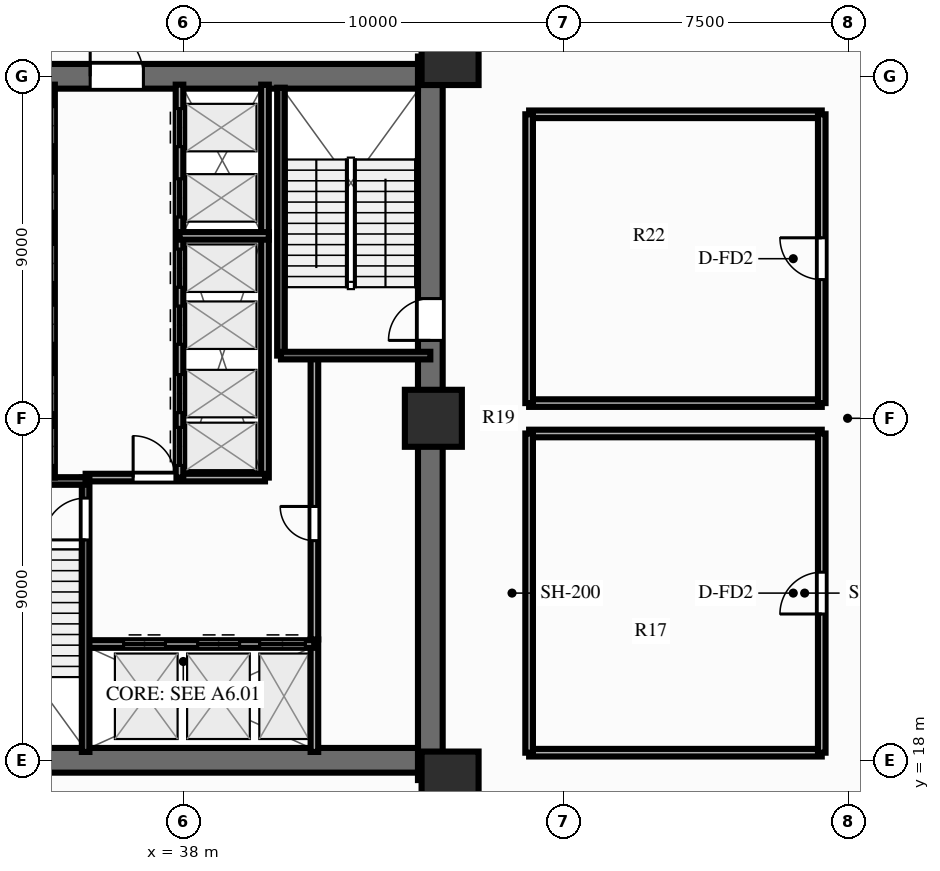
"""IFC4 building model, lengths in metres.
Left out: names, types, materials, properties, quantities, classifications, styles, units other than length and angle.
Written with IfcOpenShell. Run it as: python <this file> out.ifc"""

import sys

from ifc_helpers import new_model, si_unit, direction, frame, frame_2d, origin, origin_2d, place, context, subcontext, project, spatial, rectangle, extrude, source, transform, mapped, element, fill, save


model = new_model("IFC4")
c1 = context("Model", 3, precision=1e-05, world=origin(), true_north=direction((0.0, 1.0)))
c2 = subcontext(c1, "Body", "Model", "MODEL_VIEW")
j1 = project(units=[si_unit("LENGTHUNIT", "METRE"), si_unit("PLANEANGLEUNIT", "RADIAN")], contexts=[c1])
p1 = place(None, origin())
s1 = spatial("IfcSite", under=j1, at=p1, CompositionType="ELEMENT")
p2 = place(p1, origin())
s2 = spatial("IfcBuilding", under=s1, at=p2, CompositionType="ELEMENT")
p3 = place(p2, frame((0.0, 0.0, -4.6)))
s3 = spatial("IfcBuildingStorey", under=s2, at=p3, CompositionType="ELEMENT", Elevation=-4.6)
p4 = place(p3, frame((44.5, 17.48, 0.0), z_axis=(0.0, 0.0, 1.0), x_axis=(0.0, 1.0, 0.0)))
e1 = element("IfcWall", 1, at=p4, inside=s3, PredefinedType="SHEAR", context=c2, shape_type="SweptSolid", body=[
    extrude(rectangle(XDim=19.04, YDim=0.65, at=frame_2d((9.52, 0.0))), origin(), (0.0, 0.0, 1.0), 4.6),
])
p5 = place(p4, frame((12.67, 0.0, 0.0), z_axis=(0.0, 0.0, 1.0), x_axis=(-1.0, 0.0, 0.0)))
e2 = element("IfcOpeningElement", 2, at=p5, cuts=e1, PredefinedType="OPENING", context=c2, shape_type="SweptSolid", body=[
    extrude(rectangle(XDim=1.1, YDim=2.15, at=frame_2d((0.55, 1.075))), frame((0.0, 0.337, 0.0), z_axis=(0.0, -1.0, 0.0), x_axis=(1.0, 0.0, 0.0)), (0.0, 0.0, 1.0), 0.674),
])
p6 = place(p3, frame((31.825, 18.0, 0.0), z_axis=(0.0, 0.0, 1.0), x_axis=(1.0, 0.0, 0.0)))
e3 = element("IfcWall", 3, at=p6, inside=s3, PredefinedType="SHEAR", context=c2, shape_type="SweptSolid", body=[
    extrude(rectangle(XDim=12.35, YDim=0.65, at=frame_2d((6.175, 0.0))), origin(), (0.0, 0.0, 1.0), 4.6),
])
p7 = place(p3, frame((31.825, 36.0, 0.0), z_axis=(0.0, 0.0, 1.0), x_axis=(1.0, 0.0, 0.0)))
e4 = element("IfcWall", 4, at=p7, inside=s3, PredefinedType="SHEAR", context=c2, shape_type="SweptSolid", body=[
    extrude(rectangle(XDim=12.35, YDim=0.65, at=frame_2d((6.175, 0.0))), origin(), (0.0, 0.0, 1.0), 4.6),
])
p8 = place(p7, frame((5.125, 0.0, 0.0), z_axis=(0.0, 0.0, 1.0), x_axis=(-1.0, 0.0, 0.0)))
e5 = element("IfcOpeningElement", 5, at=p8, cuts=e4, PredefinedType="OPENING", context=c2, shape_type="SweptSolid", body=[
    extrude(rectangle(XDim=1.4, YDim=2.15, at=frame_2d((0.7, 1.075))), frame((0.0, 0.337, 0.0), z_axis=(0.0, -1.0, 0.0), x_axis=(1.0, 0.0, 0.0)), (0.0, 0.0, 1.0), 0.674),
])
m1 = source(origin(), c2, "Body", "SweptSolid", [
    extrude(rectangle(XDim=1.5, YDim=1.5, at=origin_2d()), origin(), (0.0, 0.0, 1.0), 4.6),
])
for number, where, z_axis, x_axis in (
    (6, (45.02, 17.48, 0.0), (0.0, 0.0, 1.0), (1.0, 0.0, 0.0)),
    (7, (45.02, 36.52, 0.0), (0.0, 0.0, 1.0), (1.0, 0.0, 0.0)),
    (8, (44.58, 27.0, 0.0), (0.0, 0.0, 1.0), (1.0, 0.0, 0.0)),
):
    element("IfcColumn", number, at=place(p3, frame(where, z_axis=z_axis, x_axis=x_axis)), inside=s3, PredefinedType="COLUMN", context=c2, shape_type="MappedRepresentation", body=[
        mapped(m1, transform((0.0, 0.0, 0.0), scale=1.0)),
    ])
p9 = place(p3, frame((41.45, 18.22, 0.0), z_axis=(0.0, 0.0, 1.0), x_axis=(0.0, 1.0, 0.0)))
e9 = element("IfcWall", 9, at=p9, inside=s3, PredefinedType="PARTITIONING", context=c2, shape_type="SweptSolid", body=[
    extrude(rectangle(XDim=2.96, YDim=0.2, at=frame_2d((1.48, 0.0))), origin(), (0.0, 0.0, 1.0), 4.32),
])
p10 = place(p3, frame((41.45, 21.18, 0.0), z_axis=(0.0, 0.0, 1.0), x_axis=(0.0, 1.0, 0.0)))
e10 = element("IfcWall", 10, at=p10, inside=s3, PredefinedType="PARTITIONING", context=c2, shape_type="SweptSolid", body=[
    extrude(rectangle(XDim=7.42, YDim=0.2, at=frame_2d((3.71, 0.0))), origin(), (0.0, 0.0, 1.0), 4.32),
])
p11 = place(p10, frame((2.6, 0.0, 0.0)))
e11 = element("IfcOpeningElement", 11, at=p11, cuts=e10, PredefinedType="OPENING", context=c2, shape_type="SweptSolid", body=[
    extrude(rectangle(XDim=0.9, YDim=2.1, at=frame_2d((0.45, 1.05))), frame((0.0, 0.112, 0.0), z_axis=(0.0, -1.0, 0.0), x_axis=(1.0, 0.0, 0.0)), (0.0, 0.0, 1.0), 0.224),
])
p12 = place(p3, frame((40.15, 25.44, 0.0), z_axis=(0.0, 0.0, 1.0), x_axis=(0.0, 1.0, 0.0)))
e12 = element("IfcWall", 12, at=p12, inside=s3, PredefinedType="PARTITIONING", context=c2, shape_type="SweptSolid", body=[
    extrude(rectangle(XDim=6.36, YDim=0.2, at=frame_2d((3.18, 0.0))), origin(), (0.0, 0.0, 1.0), 4.32),
])
p13 = place(p3, frame((40.15, 31.8, 0.0), z_axis=(0.0, 0.0, 1.0), x_axis=(0.0, 1.0, 0.0)))
e13 = element("IfcWall", 13, at=p13, inside=s3, PredefinedType="PARTITIONING", context=c2, shape_type="SweptSolid", body=[
    extrude(rectangle(XDim=3.98, YDim=0.2, at=frame_2d((1.99, 0.0))), origin(), (0.0, 0.0, 1.0), 4.32),
])
p14 = place(p3, frame((35.43, 21.06, 0.0), z_axis=(0.0, 0.0, 1.0), x_axis=(1.0, 0.0, 0.0)))
e14 = element("IfcWall", 14, at=p14, inside=s3, PredefinedType="PARTITIONING", context=c2, shape_type="SweptSolid", body=[
    extrude(rectangle(XDim=6.02, YDim=0.2, at=frame_2d((3.01, 0.0))), origin(), (0.0, 0.0, 1.0), 4.32),
])
p15 = place(p14, frame((1.0, 0.0, 0.0)))
e15 = element("IfcOpeningElement", 15, at=p15, cuts=e14, PredefinedType="OPENING", context=c2, shape_type="SweptSolid", body=[
    extrude(rectangle(XDim=1.1, YDim=2.15, at=frame_2d((0.55, 1.075))), frame((0.0, 0.112, 0.0), z_axis=(0.0, -1.0, 0.0), x_axis=(1.0, 0.0, 0.0)), (0.0, 0.0, 1.0), 0.224),
])
p16 = place(p14, frame((2.95, 0.0, 0.0)))
e16 = element("IfcOpeningElement", 16, at=p16, cuts=e14, PredefinedType="OPENING", context=c2, shape_type="SweptSolid", body=[
    extrude(rectangle(XDim=1.1, YDim=2.15, at=frame_2d((0.55, 1.075))), frame((0.0, 0.112, 0.0), z_axis=(0.0, -1.0, 0.0), x_axis=(1.0, 0.0, 0.0)), (0.0, 0.0, 1.0), 0.224),
])
p17 = place(p14, frame((4.58, 0.0, 0.0)))
e17 = element("IfcOpeningElement", 17, at=p17, cuts=e14, PredefinedType="OPENING", context=c2, shape_type="SweptSolid", body=[
    extrude(rectangle(XDim=1.2, YDim=2.15, at=frame_2d((0.6, 1.075))), frame((0.0, 0.112, 0.0), z_axis=(0.0, -1.0, 0.0), x_axis=(1.0, 0.0, 0.0)), (0.0, 0.0, 1.0), 0.224),
])
p18 = place(p3, frame((35.43, 25.44, 0.0), z_axis=(0.0, 0.0, 1.0), x_axis=(1.0, 0.0, 0.0)))
e18 = element("IfcWall", 18, at=p18, inside=s3, PredefinedType="PARTITIONING", context=c2, shape_type="SweptSolid", body=[
    extrude(rectangle(XDim=4.72, YDim=0.2, at=frame_2d((2.36, 0.0))), origin(), (0.0, 0.0, 1.0), 4.32),
])
p19 = place(p18, frame((1.25, 0.0, 0.0)))
e19 = element("IfcOpeningElement", 19, at=p19, cuts=e18, PredefinedType="OPENING", context=c2, shape_type="SweptSolid", body=[
    extrude(rectangle(XDim=1.1, YDim=2.15, at=frame_2d((0.55, 1.075))), frame((0.0, 0.112, 0.0), z_axis=(0.0, -1.0, 0.0), x_axis=(1.0, 0.0, 0.0)), (0.0, 0.0, 1.0), 0.224),
])
p20 = place(p3, frame((35.43, 18.22, 0.0), z_axis=(0.0, 0.0, 1.0), x_axis=(0.0, 1.0, 0.0)))
e20 = element("IfcWall", 20, at=p20, inside=s3, PredefinedType="SOLIDWALL", context=c2, shape_type="SweptSolid", body=[
    extrude(rectangle(XDim=7.22, YDim=0.2, at=frame_2d((3.61, 0.0))), origin(), (0.0, 0.0, 1.0), 4.32),
])
p21 = place(p20, frame((6.68, 0.0, 0.0), z_axis=(0.0, 0.0, 1.0), x_axis=(-1.0, 0.0, 0.0)))
e21 = element("IfcOpeningElement", 21, at=p21, cuts=e20, PredefinedType="OPENING", context=c2, shape_type="SweptSolid", body=[
    extrude(rectangle(XDim=1.1, YDim=2.15, at=frame_2d((0.55, 1.075))), frame((0.0, 0.112, 0.0), z_axis=(0.0, -1.0, 0.0), x_axis=(1.0, 0.0, 0.0)), (0.0, 0.0, 1.0), 0.224),
])
p22 = place(p3, frame((31.5, 25.35, 0.0), z_axis=(0.0, 0.0, 1.0), x_axis=(1.0, 0.0, 0.0)))
e22 = element("IfcWall", 22, at=p22, inside=s3, PredefinedType="SOLIDWALL", context=c2, shape_type="SweptSolid", body=[
    extrude(rectangle(XDim=3.93, YDim=0.2, at=frame_2d((1.965, 0.0))), origin(), (0.0, 0.0, 1.0), 4.32),
])
p23 = place(p3, frame((40.57, 28.65, 0.0), z_axis=(0.0, 0.0, 1.0), x_axis=(0.0, 1.0, 0.0)))
e23 = element("IfcWall", 23, at=p23, inside=s3, PredefinedType="SOLIDWALL", context=c2, shape_type="SweptSolid", body=[
    extrude(rectangle(XDim=7.05, YDim=0.2, at=frame_2d((3.525, 0.0))), origin(), (0.0, 0.0, 1.0), 4.32),
])
p24 = place(p3, frame((40.57, 28.65, 0.0), z_axis=(0.0, 0.0, 1.0), x_axis=(1.0, 0.0, 0.0)))
e24 = element("IfcWall", 24, at=p24, inside=s3, PredefinedType="SOLIDWALL", context=c2, shape_type="SweptSolid", body=[
    extrude(rectangle(XDim=3.93, YDim=0.2, at=frame_2d((1.965, 0.0))), origin(), (0.0, 0.0, 1.0), 4.32),
])
p25 = place(p3, frame((34.52, 25.44, 0.0), z_axis=(0.0, 0.0, 1.0), x_axis=(0.0, 1.0, 0.0)))
e25 = element("IfcWall", 25, at=p25, inside=s3, PredefinedType="PARTITIONING", context=c2, shape_type="SweptSolid", body=[
    extrude(rectangle(XDim=10.34, YDim=0.2, at=frame_2d((5.17, 0.0))), origin(), (0.0, 0.0, 1.0), 4.32),
])
p26 = place(p25, frame((0.32, 0.0, 0.0)))
e26 = element("IfcOpeningElement", 26, at=p26, cuts=e25, PredefinedType="OPENING", context=c2, shape_type="SweptSolid", body=[
    extrude(rectangle(XDim=1.0, YDim=2.15, at=frame_2d((0.5, 1.075))), frame((0.0, 0.112, 0.0), z_axis=(0.0, -1.0, 0.0), x_axis=(1.0, 0.0, 0.0)), (0.0, 0.0, 1.0), 0.224),
])
p27 = place(p25, frame((1.71, 0.0, 0.0)))
e27 = element("IfcOpeningElement", 27, at=p27, cuts=e25, PredefinedType="OPENING", context=c2, shape_type="SweptSolid", body=[
    extrude(rectangle(XDim=1.0, YDim=2.15, at=frame_2d((0.5, 1.075))), frame((0.0, 0.112, 0.0), z_axis=(0.0, -1.0, 0.0), x_axis=(1.0, 0.0, 0.0)), (0.0, 0.0, 1.0), 0.224),
])
p28 = place(p25, frame((3.535, 0.0, 0.0)))
e28 = element("IfcOpeningElement", 28, at=p28, cuts=e25, PredefinedType="OPENING", context=c2, shape_type="SweptSolid", body=[
    extrude(rectangle(XDim=1.0, YDim=2.15, at=frame_2d((0.5, 1.075))), frame((0.0, 0.112, 0.0), z_axis=(0.0, -1.0, 0.0), x_axis=(1.0, 0.0, 0.0)), (0.0, 0.0, 1.0), 0.224),
])
p29 = place(p25, frame((5.135, 0.0, 0.0)))
e29 = element("IfcOpeningElement", 29, at=p29, cuts=e25, PredefinedType="OPENING", context=c2, shape_type="SweptSolid", body=[
    extrude(rectangle(XDim=1.0, YDim=2.15, at=frame_2d((0.5, 1.075))), frame((0.0, 0.112, 0.0), z_axis=(0.0, -1.0, 0.0), x_axis=(1.0, 0.0, 0.0)), (0.0, 0.0, 1.0), 0.224),
])
p30 = place(p25, frame((7.01, 0.0, 0.0)))
e30 = element("IfcOpeningElement", 30, at=p30, cuts=e25, PredefinedType="OPENING", context=c2, shape_type="SweptSolid", body=[
    extrude(rectangle(XDim=1.0, YDim=2.15, at=frame_2d((0.5, 1.075))), frame((0.0, 0.112, 0.0), z_axis=(0.0, -1.0, 0.0), x_axis=(1.0, 0.0, 0.0)), (0.0, 0.0, 1.0), 0.224),
])
p31 = place(p25, frame((8.76, 0.0, 0.0)))
e31 = element("IfcOpeningElement", 31, at=p31, cuts=e25, PredefinedType="OPENING", context=c2, shape_type="SweptSolid", body=[
    extrude(rectangle(XDim=1.0, YDim=2.15, at=frame_2d((0.5, 1.075))), frame((0.0, 0.112, 0.0), z_axis=(0.0, -1.0, 0.0), x_axis=(1.0, 0.0, 0.0)), (0.0, 0.0, 1.0), 0.224),
])
p32 = place(p3, frame((37.9, 25.44, 0.0), z_axis=(0.0, 0.0, 1.0), x_axis=(0.0, 1.0, 0.0)))
e32 = element("IfcWall", 32, at=p32, inside=s3, PredefinedType="PARTITIONING", context=c2, shape_type="SweptSolid", body=[
    extrude(rectangle(XDim=10.34, YDim=0.2, at=frame_2d((5.17, 0.0))), origin(), (0.0, 0.0, 1.0), 4.32),
])
p33 = place(p32, frame((0.32, 0.0, 0.0)))
e33 = element("IfcOpeningElement", 33, at=p33, cuts=e32, PredefinedType="OPENING", context=c2, shape_type="SweptSolid", body=[
    extrude(rectangle(XDim=1.0, YDim=2.15, at=frame_2d((0.5, 1.075))), frame((0.0, 0.112, 0.0), z_axis=(0.0, -1.0, 0.0), x_axis=(1.0, 0.0, 0.0)), (0.0, 0.0, 1.0), 0.224),
])
p34 = place(p32, frame((1.71, 0.0, 0.0)))
e34 = element("IfcOpeningElement", 34, at=p34, cuts=e32, PredefinedType="OPENING", context=c2, shape_type="SweptSolid", body=[
    extrude(rectangle(XDim=1.0, YDim=2.15, at=frame_2d((0.5, 1.075))), frame((0.0, 0.112, 0.0), z_axis=(0.0, -1.0, 0.0), x_axis=(1.0, 0.0, 0.0)), (0.0, 0.0, 1.0), 0.224),
])
p35 = place(p32, frame((3.51, 0.0, 0.0)))
e35 = element("IfcOpeningElement", 35, at=p35, cuts=e32, PredefinedType="OPENING", context=c2, shape_type="SweptSolid", body=[
    extrude(rectangle(XDim=1.0, YDim=2.15, at=frame_2d((0.5, 1.075))), frame((0.0, 0.112, 0.0), z_axis=(0.0, -1.0, 0.0), x_axis=(1.0, 0.0, 0.0)), (0.0, 0.0, 1.0), 0.224),
])
p36 = place(p32, frame((5.01, 0.0, 0.0)))
e36 = element("IfcOpeningElement", 36, at=p36, cuts=e32, PredefinedType="OPENING", context=c2, shape_type="SweptSolid", body=[
    extrude(rectangle(XDim=1.0, YDim=2.15, at=frame_2d((0.5, 1.075))), frame((0.0, 0.112, 0.0), z_axis=(0.0, -1.0, 0.0), x_axis=(1.0, 0.0, 0.0)), (0.0, 0.0, 1.0), 0.224),
])
p37 = place(p32, frame((6.86, 0.0, 0.0)))
e37 = element("IfcOpeningElement", 37, at=p37, cuts=e32, PredefinedType="OPENING", context=c2, shape_type="SweptSolid", body=[
    extrude(rectangle(XDim=1.0, YDim=2.15, at=frame_2d((0.5, 1.075))), frame((0.0, 0.112, 0.0), z_axis=(0.0, -1.0, 0.0), x_axis=(1.0, 0.0, 0.0)), (0.0, 0.0, 1.0), 0.224),
])
p38 = place(p32, frame((8.71, 0.0, 0.0)))
e38 = element("IfcOpeningElement", 38, at=p38, cuts=e32, PredefinedType="OPENING", context=c2, shape_type="SweptSolid", body=[
    extrude(rectangle(XDim=1.0, YDim=2.15, at=frame_2d((0.5, 1.075))), frame((0.0, 0.112, 0.0), z_axis=(0.0, -1.0, 0.0), x_axis=(1.0, 0.0, 0.0)), (0.0, 0.0, 1.0), 0.224),
])
p39 = place(p3, frame((37.9, 31.8, 0.0), z_axis=(0.0, 0.0, 1.0), x_axis=(1.0, 0.0, 0.0)))
e39 = element("IfcWall", 39, at=p39, inside=s3, PredefinedType="PARTITIONING", context=c2, shape_type="SweptSolid", body=[
    extrude(rectangle(XDim=2.35, YDim=0.2, at=frame_2d((1.175, 0.0))), origin(), (0.0, 0.0, 1.0), 4.32),
])
for number, where, z_axis, x_axis in (
    (40, (47.1, 18.2, 0.0), (0.0, 0.0, 1.0), (1.0, 0.0, 0.0)),
    (41, (47.1, 26.6, 0.0), (0.0, 0.0, 1.0), (1.0, 0.0, 0.0)),
):
    element("IfcWall", number, at=place(p3, frame(where, z_axis=z_axis, x_axis=x_axis)), inside=s3, PredefinedType="PARTITIONING", context=c2, shape_type="SweptSolid", body=[
        extrude(rectangle(XDim=7.7, YDim=0.2, at=frame_2d((3.85, 0.0))), origin(), (0.0, 0.0, 1.0), 4.32),
    ])
p40 = place(p3, frame((47.1, 18.2, 0.0), z_axis=(0.0, 0.0, 1.0), x_axis=(0.0, 1.0, 0.0)))
e42 = element("IfcWall", 42, at=p40, inside=s3, PredefinedType="PARTITIONING", context=c2, shape_type="SweptSolid", body=[
    extrude(rectangle(XDim=8.4, YDim=0.2, at=frame_2d((4.2, 0.0))), origin(), (0.0, 0.0, 1.0), 4.32),
])
p41 = place(p3, frame((54.8, 18.2, 0.0), z_axis=(0.0, 0.0, 1.0), x_axis=(0.0, 1.0, 0.0)))
e43 = element("IfcWall", 43, at=p41, inside=s3, PredefinedType="PARTITIONING", context=c2, shape_type="SweptSolid", body=[
    extrude(rectangle(XDim=8.4, YDim=0.2, at=frame_2d((4.2, 0.0))), origin(), (0.0, 0.0, 1.0), 4.32),
])
p42 = place(p41, frame((3.65, 0.0, 0.0)))
e44 = element("IfcOpeningElement", 44, at=p42, cuts=e43, PredefinedType="OPENING", context=c2, shape_type="SweptSolid", body=[
    extrude(rectangle(XDim=1.1, YDim=2.15, at=frame_2d((0.55, 1.075))), frame((0.0, 0.112, 0.0), z_axis=(0.0, -1.0, 0.0), x_axis=(1.0, 0.0, 0.0)), (0.0, 0.0, 1.0), 0.224),
])
for number, where, z_axis, x_axis in (
    (45, (47.1, 27.4, 0.0), (0.0, 0.0, 1.0), (1.0, 0.0, 0.0)),
    (46, (47.1, 35.0, 0.0), (0.0, 0.0, 1.0), (1.0, 0.0, 0.0)),
):
    element("IfcWall", number, at=place(p3, frame(where, z_axis=z_axis, x_axis=x_axis)), inside=s3, PredefinedType="PARTITIONING", context=c2, shape_type="SweptSolid", body=[
        extrude(rectangle(XDim=7.7, YDim=0.2, at=frame_2d((3.85, 0.0))), origin(), (0.0, 0.0, 1.0), 4.32),
    ])
p43 = place(p3, frame((47.1, 27.4, 0.0), z_axis=(0.0, 0.0, 1.0), x_axis=(0.0, 1.0, 0.0)))
e47 = element("IfcWall", 47, at=p43, inside=s3, PredefinedType="PARTITIONING", context=c2, shape_type="SweptSolid", body=[
    extrude(rectangle(XDim=7.6, YDim=0.2, at=frame_2d((3.8, 0.0))), origin(), (0.0, 0.0, 1.0), 4.32),
])
p44 = place(p3, frame((54.8, 27.4, 0.0), z_axis=(0.0, 0.0, 1.0), x_axis=(0.0, 1.0, 0.0)))
e48 = element("IfcWall", 48, at=p44, inside=s3, PredefinedType="PARTITIONING", context=c2, shape_type="SweptSolid", body=[
    extrude(rectangle(XDim=7.6, YDim=0.2, at=frame_2d((3.8, 0.0))), origin(), (0.0, 0.0, 1.0), 4.32),
])
p45 = place(p44, frame((3.25, 0.0, 0.0)))
e49 = element("IfcOpeningElement", 49, at=p45, cuts=e48, PredefinedType="OPENING", context=c2, shape_type="SweptSolid", body=[
    extrude(rectangle(XDim=1.1, YDim=2.15, at=frame_2d((0.55, 1.075))), frame((0.0, 0.112, 0.0), z_axis=(0.0, -1.0, 0.0), x_axis=(1.0, 0.0, 0.0)), (0.0, 0.0, 1.0), 0.224),
])
m2 = source(origin(), c2, "Body", "SweptSolid", [
    extrude(rectangle(XDim=1.1, YDim=2.15, at=frame_2d((0.55, 1.075))), frame((0.0, 0.025, 0.0), z_axis=(0.0, -1.0, 0.0), x_axis=(1.0, 0.0, 0.0)), (0.0, 0.0, 1.0), 0.05),
])
p46 = place(p5, origin())
e50 = element("IfcDoor", 50, at=p46, inside=s3, OperationType="SINGLE_SWING_RIGHT", PredefinedType="DOOR", context=c2, shape_type="MappedRepresentation", body=[
    mapped(m2, transform((0.0, 0.0, 0.0), scale=1.0)),
])
fill(e2, e50)
m3 = source(origin(), c2, "Body", "SweptSolid", [
    extrude(rectangle(XDim=1.4, YDim=2.15, at=frame_2d((0.7, 1.075))), frame((0.0, 0.025, 0.0), z_axis=(0.0, -1.0, 0.0), x_axis=(1.0, 0.0, 0.0)), (0.0, 0.0, 1.0), 0.05),
])
p47 = place(p8, origin())
e51 = element("IfcDoor", 51, at=p47, inside=s3, OperationType="SINGLE_SWING_RIGHT", PredefinedType="DOOR", context=c2, shape_type="MappedRepresentation", body=[
    mapped(m3, transform((0.0, 0.0, 0.0), scale=1.0)),
])
fill(e5, e51)
m4 = source(origin(), c2, "Body", "SweptSolid", [
    extrude(rectangle(XDim=0.9, YDim=2.1, at=frame_2d((0.45, 1.05))), frame((0.0, 0.025, 0.0), z_axis=(0.0, -1.0, 0.0), x_axis=(1.0, 0.0, 0.0)), (0.0, 0.0, 1.0), 0.05),
])
p48 = place(p11, origin())
e52 = element("IfcDoor", 52, at=p48, inside=s3, OperationType="SINGLE_SWING_RIGHT", PredefinedType="DOOR", context=c2, shape_type="MappedRepresentation", body=[
    mapped(m4, transform((0.0, 0.0, 0.0), scale=1.0)),
])
fill(e11, e52)
p49 = place(p15, origin())
e53 = element("IfcDoor", 53, at=p49, inside=s3, OperationType="DOUBLE_DOOR_SLIDING", PredefinedType="DOOR", context=c2, shape_type="MappedRepresentation", body=[
    mapped(m2, transform((0.0, 0.0, 0.0), scale=1.0)),
])
fill(e15, e53)
p50 = place(p16, origin())
e54 = element("IfcDoor", 54, at=p50, inside=s3, OperationType="DOUBLE_DOOR_SLIDING", PredefinedType="DOOR", context=c2, shape_type="MappedRepresentation", body=[
    mapped(m2, transform((0.0, 0.0, 0.0), scale=1.0)),
])
fill(e16, e54)
m5 = source(origin(), c2, "Body", "SweptSolid", [
    extrude(rectangle(XDim=1.2, YDim=2.15, at=frame_2d((0.6, 1.075))), frame((0.0, 0.025, 0.0), z_axis=(0.0, -1.0, 0.0), x_axis=(1.0, 0.0, 0.0)), (0.0, 0.0, 1.0), 0.05),
])
p51 = place(p17, origin())
e55 = element("IfcDoor", 55, at=p51, inside=s3, OperationType="DOUBLE_DOOR_SLIDING", PredefinedType="DOOR", context=c2, shape_type="MappedRepresentation", body=[
    mapped(m5, transform((0.0, 0.0, 0.0), scale=1.0)),
])
fill(e17, e55)
p52 = place(p19, origin())
e56 = element("IfcDoor", 56, at=p52, inside=s3, OperationType="SINGLE_SWING_LEFT", PredefinedType="DOOR", context=c2, shape_type="MappedRepresentation", body=[
    mapped(m2, transform((0.0, 0.0, 0.0), scale=1.0)),
])
fill(e19, e56)
p53 = place(p21, origin())
e57 = element("IfcDoor", 57, at=p53, inside=s3, OperationType="SINGLE_SWING_RIGHT", PredefinedType="DOOR", context=c2, shape_type="MappedRepresentation", body=[
    mapped(m2, transform((0.0, 0.0, 0.0), scale=1.0)),
])
fill(e21, e57)
m6 = source(origin(), c2, "Body", "SweptSolid", [
    extrude(rectangle(XDim=1.0, YDim=2.15, at=frame_2d((0.5, 1.075))), frame((0.0, 0.025, 0.0), z_axis=(0.0, -1.0, 0.0), x_axis=(1.0, 0.0, 0.0)), (0.0, 0.0, 1.0), 0.05),
])
p54 = place(p33, origin())
e58 = element("IfcDoor", 58, at=p54, inside=s3, OperationType="DOUBLE_DOOR_SLIDING", PredefinedType="DOOR", context=c2, shape_type="MappedRepresentation", body=[
    mapped(m6, transform((0.0, 0.0, 0.0), scale=1.0)),
])
fill(e33, e58)
p55 = place(p34, origin())
e59 = element("IfcDoor", 59, at=p55, inside=s3, OperationType="DOUBLE_DOOR_SLIDING", PredefinedType="DOOR", context=c2, shape_type="MappedRepresentation", body=[
    mapped(m6, transform((0.0, 0.0, 0.0), scale=1.0)),
])
fill(e34, e59)
p56 = place(p35, origin())
e60 = element("IfcDoor", 60, at=p56, inside=s3, OperationType="DOUBLE_DOOR_SLIDING", PredefinedType="DOOR", context=c2, shape_type="MappedRepresentation", body=[
    mapped(m6, transform((0.0, 0.0, 0.0), scale=1.0)),
])
fill(e35, e60)
p57 = place(p36, origin())
e61 = element("IfcDoor", 61, at=p57, inside=s3, OperationType="DOUBLE_DOOR_SLIDING", PredefinedType="DOOR", context=c2, shape_type="MappedRepresentation", body=[
    mapped(m6, transform((0.0, 0.0, 0.0), scale=1.0)),
])
fill(e36, e61)
p58 = place(p37, origin())
e62 = element("IfcDoor", 62, at=p58, inside=s3, OperationType="DOUBLE_DOOR_SLIDING", PredefinedType="DOOR", context=c2, shape_type="MappedRepresentation", body=[
    mapped(m6, transform((0.0, 0.0, 0.0), scale=1.0)),
])
fill(e37, e62)
p59 = place(p38, origin())
e63 = element("IfcDoor", 63, at=p59, inside=s3, OperationType="DOUBLE_DOOR_SLIDING", PredefinedType="DOOR", context=c2, shape_type="MappedRepresentation", body=[
    mapped(m6, transform((0.0, 0.0, 0.0), scale=1.0)),
])
fill(e38, e63)
p60 = place(p42, origin())
e64 = element("IfcDoor", 64, at=p60, inside=s3, OperationType="SINGLE_SWING_LEFT", PredefinedType="DOOR", context=c2, shape_type="MappedRepresentation", body=[
    mapped(m2, transform((0.0, 0.0, 0.0), scale=1.0)),
])
fill(e44, e64)
p61 = place(p45, origin())
e65 = element("IfcDoor", 65, at=p61, inside=s3, OperationType="SINGLE_SWING_RIGHT", PredefinedType="DOOR", context=c2, shape_type="MappedRepresentation", body=[
    mapped(m2, transform((0.0, 0.0, 0.0), scale=1.0)),
])
fill(e49, e65)
save(model, sys.argv[1])
